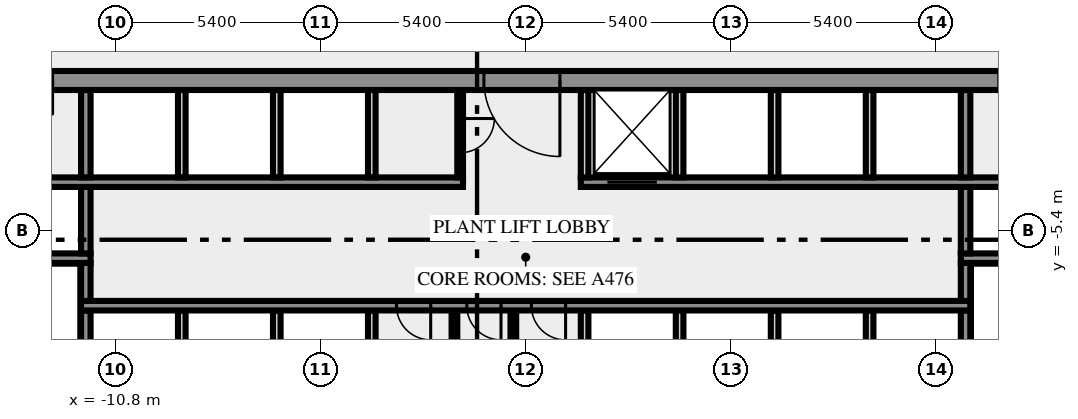
"""IFC4 building model, lengths in metres.
Left out: names, types, materials, properties, quantities, classifications, styles, units other than length and angle.
Written with IfcOpenShell. Run it as: python <this file> out.ifc"""

import sys

from ifc_helpers import new_model, si_unit, direction, frame, frame_2d, origin, place, context, subcontext, project, spatial, rectangle, extrude, element, fill, save


model = new_model("IFC4")
c1 = context("Model", 3, precision=1e-05, world=origin(), true_north=direction((0.0, 1.0)))
c2 = subcontext(c1, "Body", "Model", "MODEL_VIEW")
j1 = project(units=[si_unit("LENGTHUNIT", "METRE"), si_unit("PLANEANGLEUNIT", "RADIAN")], contexts=[c1])
p1 = place(None, origin())
s1 = spatial("IfcSite", under=j1, at=p1, CompositionType="ELEMENT")
p2 = place(p1, origin())
s2 = spatial("IfcBuilding", under=s1, at=p2, CompositionType="ELEMENT")
p3 = place(p2, frame((0.0, 0.0, 133.0)))
s3 = spatial("IfcBuildingStorey", under=s2, at=p3, CompositionType="ELEMENT", Elevation=133.0)
p4 = place(p3, frame((-11.575, -10.5, 0.0), z_axis=(0.0, 0.0, 1.0), x_axis=(0.0, 1.0, 0.0)))
e1 = element("IfcWall", 1, at=p4, inside=s3, PredefinedType="SHEAR", context=c2, shape_type="SweptSolid", body=[
    extrude(rectangle(XDim=3.0, YDim=0.25, at=frame_2d((1.5, 0.0))), origin(), (0.0, 0.0, 1.0), 5.6),
])
for number, where, z_axis, x_axis in (
    (2, (-9.05, -10.5, 0.0), (0.0, 0.0, 1.0), (0.0, 1.0, 0.0)),
    (3, (-6.55, -10.5, 0.0), (0.0, 0.0, 1.0), (0.0, 1.0, 0.0)),
    (4, (-4.05, -10.5, 0.0), (0.0, 0.0, 1.0), (0.0, 1.0, 0.0)),
):
    element("IfcWall", number, at=place(p3, frame(where, z_axis=z_axis, x_axis=x_axis)), inside=s3, PredefinedType="SOLIDWALL", context=c2, shape_type="SweptSolid", body=[
        extrude(rectangle(XDim=3.0, YDim=0.2, at=frame_2d((1.5, 0.0))), origin(), (0.0, 0.0, 1.0), 5.6),
    ])
for number, where, z_axis, x_axis in (
    (5, (-1.875, -10.5, 0.0), (0.0, 0.0, 1.0), (0.0, 1.0, 0.0)),
    (6, (-0.325, -10.5, 0.0), (0.0, 0.0, 1.0), (0.0, 1.0, 0.0)),
):
    element("IfcWall", number, at=place(p3, frame(where, z_axis=z_axis, x_axis=x_axis)), inside=s3, PredefinedType="PARTITIONING", context=c2, shape_type="SweptSolid", body=[
        extrude(rectangle(XDim=3.0, YDim=0.15, at=frame_2d((1.5, 0.0))), origin(), (0.0, 0.0, 1.0), 5.6),
    ])
for number, where, z_axis, x_axis in (
    (7, (1.55, -10.5, 0.0), (0.0, 0.0, 1.0), (0.0, 1.0, 0.0)),
    (8, (4.05, -10.5, 0.0), (0.0, 0.0, 1.0), (0.0, 1.0, 0.0)),
    (9, (6.55, -10.5, 0.0), (0.0, 0.0, 1.0), (0.0, 1.0, 0.0)),
    (10, (9.05, -10.5, 0.0), (0.0, 0.0, 1.0), (0.0, 1.0, 0.0)),
):
    element("IfcWall", number, at=place(p3, frame(where, z_axis=z_axis, x_axis=x_axis)), inside=s3, PredefinedType="SOLIDWALL", context=c2, shape_type="SweptSolid", body=[
        extrude(rectangle(XDim=3.0, YDim=0.2, at=frame_2d((1.5, 0.0))), origin(), (0.0, 0.0, 1.0), 5.6),
    ])
p5 = place(p3, frame((11.575, -10.5, 0.0), z_axis=(0.0, 0.0, 1.0), x_axis=(0.0, 1.0, 0.0)))
e11 = element("IfcWall", 11, at=p5, inside=s3, PredefinedType="SHEAR", context=c2, shape_type="SweptSolid", body=[
    extrude(rectangle(XDim=3.0, YDim=0.25, at=frame_2d((1.5, 0.0))), origin(), (0.0, 0.0, 1.0), 5.6),
])
p6 = place(p3, frame((11.7, -7.375, 0.0), z_axis=(0.0, 0.0, 1.0), x_axis=(-1.0, 0.0, 0.0)))
e12 = element("IfcWall", 12, at=p6, inside=s3, PredefinedType="SHEAR", context=c2, shape_type="SweptSolid", body=[
    extrude(rectangle(XDim=23.4, YDim=0.25, at=frame_2d((11.7, 0.0))), origin(), (0.0, 0.0, 1.0), 5.6),
])
p7 = place(p6, frame((14.2, 0.0, 0.0)))
e13 = element("IfcOpeningElement", 13, at=p7, cuts=e12, PredefinedType="OPENING", context=c2, shape_type="SweptSolid", body=[
    extrude(rectangle(XDim=0.9, YDim=2.1, at=frame_2d((0.45, 1.05))), frame((0.0, 0.135, 0.0), z_axis=(0.0, -1.0, 0.0), x_axis=(1.0, 0.0, 0.0)), (0.0, 0.0, 1.0), 0.27),
])
p8 = place(p6, frame((12.35, 0.0, 0.0)))
e14 = element("IfcOpeningElement", 14, at=p8, cuts=e12, PredefinedType="OPENING", context=c2, shape_type="SweptSolid", body=[
    extrude(rectangle(XDim=0.9, YDim=2.1, at=frame_2d((0.45, 1.05))), frame((0.0, 0.135, 0.0), z_axis=(0.0, -1.0, 0.0), x_axis=(1.0, 0.0, 0.0)), (0.0, 0.0, 1.0), 0.27),
])
p9 = place(p6, frame((10.65, 0.0, 0.0)))
e15 = element("IfcOpeningElement", 15, at=p9, cuts=e12, PredefinedType="OPENING", context=c2, shape_type="SweptSolid", body=[
    extrude(rectangle(XDim=0.9, YDim=2.1, at=frame_2d((0.45, 1.05))), frame((0.0, 0.135, 0.0), z_axis=(0.0, -1.0, 0.0), x_axis=(1.0, 0.0, 0.0)), (0.0, 0.0, 1.0), 0.27),
])
for number, where, z_axis, x_axis in (
    (16, (-11.575, -7.25, 0.0), (0.0, 0.0, 1.0), (0.0, 1.0, 0.0)),
    (17, (11.575, -7.25, 0.0), (0.0, 0.0, 1.0), (0.0, 1.0, 0.0)),
):
    element("IfcWall", number, at=place(p3, frame(where, z_axis=z_axis, x_axis=x_axis)), inside=s3, PredefinedType="SHEAR", context=c2, shape_type="SweptSolid", body=[
        extrude(rectangle(XDim=1.0, YDim=0.25, at=frame_2d((0.5, 0.0))), origin(), (0.0, 0.0, 1.0), 5.6),
    ])
p10 = place(p3, frame((-11.45, -6.125, 0.0), z_axis=(0.0, 0.0, 1.0), x_axis=(-1.0, 0.0, 0.0)))
e18 = element("IfcWall", 18, at=p10, inside=s3, PredefinedType="SHEAR", context=c2, shape_type="SweptSolid", body=[
    extrude(rectangle(XDim=8.05, YDim=0.25, at=frame_2d((4.025, 0.0))), origin(), (0.0, 0.0, 1.0), 5.6),
])
p11 = place(p10, frame((6.2, 0.0, 0.0)))
e19 = element("IfcOpeningElement", 19, at=p11, cuts=e18, PredefinedType="OPENING", context=c2, shape_type="SweptSolid", body=[
    extrude(rectangle(XDim=1.8, YDim=2.1, at=frame_2d((0.9, 1.05))), frame((0.0, 0.135, 0.0), z_axis=(0.0, -1.0, 0.0), x_axis=(1.0, 0.0, 0.0)), (0.0, 0.0, 1.0), 0.27),
])
p12 = place(p3, frame((19.5, -6.125, 0.0), z_axis=(0.0, 0.0, 1.0), x_axis=(-1.0, 0.0, 0.0)))
e20 = element("IfcWall", 20, at=p12, inside=s3, PredefinedType="SHEAR", context=c2, shape_type="SweptSolid", body=[
    extrude(rectangle(XDim=8.05, YDim=0.25, at=frame_2d((4.025, 0.0))), origin(), (0.0, 0.0, 1.0), 5.6),
])
p13 = place(p12, frame((0.05, 0.0, 0.0)))
e21 = element("IfcOpeningElement", 21, at=p13, cuts=e20, PredefinedType="OPENING", context=c2, shape_type="SweptSolid", body=[
    extrude(rectangle(XDim=1.8, YDim=2.1, at=frame_2d((0.9, 1.05))), frame((0.0, 0.135, 0.0), z_axis=(0.0, -1.0, 0.0), x_axis=(1.0, 0.0, 0.0)), (0.0, 0.0, 1.0), 0.27),
])
for number, where, z_axis, x_axis in (
    (22, (-11.575, -6.0, 0.0), (0.0, 0.0, 1.0), (0.0, 1.0, 0.0)),
    (23, (11.575, -6.0, 0.0), (0.0, 0.0, 1.0), (0.0, 1.0, 0.0)),
):
    element("IfcWall", number, at=place(p3, frame(where, z_axis=z_axis, x_axis=x_axis)), inside=s3, PredefinedType="SHEAR", context=c2, shape_type="SweptSolid", body=[
        extrude(rectangle(XDim=1.75, YDim=0.25, at=frame_2d((0.875, 0.0))), origin(), (0.0, 0.0, 1.0), 5.6),
    ])
p14 = place(p3, frame((-14.35, -4.125, 0.0), z_axis=(0.0, 0.0, 1.0), x_axis=(1.0, 0.0, 0.0)))
e24 = element("IfcWall", 24, at=p14, inside=s3, PredefinedType="SHEAR", context=c2, shape_type="SweptSolid", body=[
    extrude(rectangle(XDim=12.7, YDim=0.25, at=frame_2d((6.35, 0.0))), origin(), (0.0, 0.0, 1.0), 5.6),
])
p15 = place(p3, frame((1.45, -4.125, 0.0), z_axis=(0.0, 0.0, 1.0), x_axis=(1.0, 0.0, 0.0)))
e25 = element("IfcWall", 25, at=p15, inside=s3, PredefinedType="SHEAR", context=c2, shape_type="SweptSolid", body=[
    extrude(rectangle(XDim=12.9, YDim=0.25, at=frame_2d((6.45, 0.0))), origin(), (0.0, 0.0, 1.0), 5.6),
])
p16 = place(p15, frame((0.7, 0.0, 0.0)))
e26 = element("IfcOpeningElement", 26, at=p16, cuts=e25, PredefinedType="OPENING", context=c2, shape_type="SweptSolid", body=[
    extrude(rectangle(XDim=1.3, YDim=2.1, at=frame_2d((0.65, 1.05))), frame((0.0, 0.135, 0.0), z_axis=(0.0, -1.0, 0.0), x_axis=(1.0, 0.0, 0.0)), (0.0, 0.0, 1.0), 0.27),
])
p17 = place(p3, frame((-11.575, -4.0, 0.0), z_axis=(0.0, 0.0, 1.0), x_axis=(0.0, 1.0, 0.0)))
e27 = element("IfcWall", 27, at=p17, inside=s3, PredefinedType="SHEAR", context=c2, shape_type="SweptSolid", body=[
    extrude(rectangle(XDim=2.3, YDim=0.25, at=frame_2d((1.15, 0.0))), origin(), (0.0, 0.0, 1.0), 5.6),
])
for number, where, z_axis, x_axis in (
    (28, (-9.05, -4.0, 0.0), (0.0, 0.0, 1.0), (0.0, 1.0, 0.0)),
    (29, (-6.55, -4.0, 0.0), (0.0, 0.0, 1.0), (0.0, 1.0, 0.0)),
    (30, (-4.05, -4.0, 0.0), (0.0, 0.0, 1.0), (0.0, 1.0, 0.0)),
):
    element("IfcWall", number, at=place(p3, frame(where, z_axis=z_axis, x_axis=x_axis)), inside=s3, PredefinedType="SOLIDWALL", context=c2, shape_type="SweptSolid", body=[
        extrude(rectangle(XDim=2.3, YDim=0.2, at=frame_2d((1.15, 0.0))), origin(), (0.0, 0.0, 1.0), 5.6),
    ])
p18 = place(p3, frame((-1.725, -1.7, 0.0), z_axis=(0.0, 0.0, 1.0), x_axis=(0.0, -1.0, 0.0)))
e31 = element("IfcWall", 31, at=p18, inside=s3, PredefinedType="PARTITIONING", context=c2, shape_type="SweptSolid", body=[
    extrude(rectangle(XDim=2.3, YDim=0.15, at=frame_2d((1.15, 0.0))), origin(), (0.0, 0.0, 1.0), 5.6),
])
p19 = place(p18, frame((0.75, 0.0, 0.0)))
e32 = element("IfcOpeningElement", 32, at=p19, cuts=e31, PredefinedType="OPENING", context=c2, shape_type="SweptSolid", body=[
    extrude(rectangle(XDim=0.9, YDim=2.1, at=frame_2d((0.45, 1.05))), frame((0.0, 0.085, 0.0), z_axis=(0.0, -1.0, 0.0), x_axis=(1.0, 0.0, 0.0)), (0.0, 0.0, 1.0), 0.17),
])
for number, where, z_axis, x_axis in (
    (33, (1.55, -4.0, 0.0), (0.0, 0.0, 1.0), (0.0, 1.0, 0.0)),
    (34, (4.05, -4.0, 0.0), (0.0, 0.0, 1.0), (0.0, 1.0, 0.0)),
    (35, (6.55, -4.0, 0.0), (0.0, 0.0, 1.0), (0.0, 1.0, 0.0)),
    (36, (9.05, -4.0, 0.0), (0.0, 0.0, 1.0), (0.0, 1.0, 0.0)),
):
    element("IfcWall", number, at=place(p3, frame(where, z_axis=z_axis, x_axis=x_axis)), inside=s3, PredefinedType="SOLIDWALL", context=c2, shape_type="SweptSolid", body=[
        extrude(rectangle(XDim=2.3, YDim=0.2, at=frame_2d((1.15, 0.0))), origin(), (0.0, 0.0, 1.0), 5.6),
    ])
p20 = place(p3, frame((11.575, -4.0, 0.0), z_axis=(0.0, 0.0, 1.0), x_axis=(0.0, 1.0, 0.0)))
e37 = element("IfcWall", 37, at=p20, inside=s3, PredefinedType="SHEAR", context=c2, shape_type="SweptSolid", body=[
    extrude(rectangle(XDim=2.3, YDim=0.25, at=frame_2d((1.15, 0.0))), origin(), (0.0, 0.0, 1.0), 5.6),
])
p21 = place(p3, frame((20.49, -1.45, 0.0), z_axis=(0.0, 0.0, 1.0), x_axis=(-1.0, 0.0, 0.0)))
e38 = element("IfcWall", 38, at=p21, inside=s3, PredefinedType="SHEAR", context=c2, shape_type="SweptSolid", body=[
    extrude(rectangle(XDim=40.98, YDim=0.5, at=frame_2d((20.49, 0.0))), origin(), (0.0, 0.0, 1.0), 5.6),
])
p22 = place(p21, frame((38.14, 0.0, 0.0)))
e39 = element("IfcOpeningElement", 39, at=p22, cuts=e38, PredefinedType="OPENING", context=c2, shape_type="SweptSolid", body=[
    extrude(rectangle(XDim=1.8, YDim=2.1, at=frame_2d((0.9, 1.05))), frame((0.0, 0.26, 0.0), z_axis=(0.0, -1.0, 0.0), x_axis=(1.0, 0.0, 0.0)), (0.0, 0.0, 1.0), 0.52),
])
p23 = place(p21, frame((35.89, 0.0, 0.0)))
e40 = element("IfcOpeningElement", 40, at=p23, cuts=e38, PredefinedType="OPENING", context=c2, shape_type="SweptSolid", body=[
    extrude(rectangle(XDim=0.9, YDim=2.1, at=frame_2d((0.45, 1.05))), frame((0.0, 0.26, 0.0), z_axis=(0.0, -1.0, 0.0), x_axis=(1.0, 0.0, 0.0)), (0.0, 0.0, 1.0), 0.52),
])
p24 = place(p21, frame((32.94, 0.0, 0.0)))
e41 = element("IfcOpeningElement", 41, at=p24, cuts=e38, PredefinedType="OPENING", context=c2, shape_type="SweptSolid", body=[
    extrude(rectangle(XDim=0.9, YDim=2.1, at=frame_2d((0.45, 1.05))), frame((0.0, 0.26, 0.0), z_axis=(0.0, -1.0, 0.0), x_axis=(1.0, 0.0, 0.0)), (0.0, 0.0, 1.0), 0.52),
])
p25 = place(p21, frame((19.59, 0.0, 0.0)))
e42 = element("IfcOpeningElement", 42, at=p25, cuts=e38, PredefinedType="OPENING", context=c2, shape_type="SweptSolid", body=[
    extrude(rectangle(XDim=2.0, YDim=2.1, at=frame_2d((1.0, 1.05))), frame((0.0, 0.26, 0.0), z_axis=(0.0, -1.0, 0.0), x_axis=(1.0, 0.0, 0.0)), (0.0, 0.0, 1.0), 0.52),
])
p26 = place(p21, frame((7.14, 0.0, 0.0)))
e43 = element("IfcOpeningElement", 43, at=p26, cuts=e38, PredefinedType="OPENING", context=c2, shape_type="SweptSolid", body=[
    extrude(rectangle(XDim=0.9, YDim=2.1, at=frame_2d((0.45, 1.05))), frame((0.0, 0.26, 0.0), z_axis=(0.0, -1.0, 0.0), x_axis=(1.0, 0.0, 0.0)), (0.0, 0.0, 1.0), 0.52),
])
p27 = place(p21, frame((5.028, 0.0, 0.0)))
e44 = element("IfcOpeningElement", 44, at=p27, cuts=e38, PredefinedType="OPENING", context=c2, shape_type="SweptSolid", body=[
    extrude(rectangle(XDim=0.8, YDim=2.1, at=frame_2d((0.4, 1.05))), frame((0.0, 0.26, 0.0), z_axis=(0.0, -1.0, 0.0), x_axis=(1.0, 0.0, 0.0)), (0.0, 0.0, 1.0), 0.52),
])
p28 = place(p21, frame((3.452, 0.0, 0.0)))
e45 = element("IfcOpeningElement", 45, at=p28, cuts=e38, PredefinedType="OPENING", context=c2, shape_type="SweptSolid", body=[
    extrude(rectangle(XDim=0.8, YDim=2.1, at=frame_2d((0.4, 1.05))), frame((0.0, 0.26, 0.0), z_axis=(0.0, -1.0, 0.0), x_axis=(1.0, 0.0, 0.0)), (0.0, 0.0, 1.0), 0.52),
])
p29 = place(p21, frame((1.04, 0.0, 0.0)))
e46 = element("IfcOpeningElement", 46, at=p29, cuts=e38, PredefinedType="OPENING", context=c2, shape_type="SweptSolid", body=[
    extrude(rectangle(XDim=1.8, YDim=2.1, at=frame_2d((0.9, 1.05))), frame((0.0, 0.26, 0.0), z_axis=(0.0, -1.0, 0.0), x_axis=(1.0, 0.0, 0.0)), (0.0, 0.0, 1.0), 0.52),
])
p30 = place(p7, origin())
e47 = element("IfcDoor", 47, at=p30, inside=s3, OperationType="SINGLE_SWING_RIGHT", PredefinedType="DOOR", context=c2, shape_type="SweptSolid", body=[
    extrude(rectangle(XDim=0.9, YDim=2.1, at=frame_2d((0.45, 1.05))), frame((0.0, 0.025, 0.0), z_axis=(0.0, -1.0, 0.0), x_axis=(1.0, 0.0, 0.0)), (0.0, 0.0, 1.0), 0.05),
])
fill(e13, e47)
p31 = place(p8, origin())
e48 = element("IfcDoor", 48, at=p31, inside=s3, OperationType="SINGLE_SWING_RIGHT", PredefinedType="DOOR", context=c2, shape_type="SweptSolid", body=[
    extrude(rectangle(XDim=0.9, YDim=2.1, at=frame_2d((0.45, 1.05))), frame((0.0, 0.025, 0.0), z_axis=(0.0, -1.0, 0.0), x_axis=(1.0, 0.0, 0.0)), (0.0, 0.0, 1.0), 0.05),
])
fill(e14, e48)
p32 = place(p9, origin())
e49 = element("IfcDoor", 49, at=p32, inside=s3, OperationType="SINGLE_SWING_LEFT", PredefinedType="DOOR", context=c2, shape_type="SweptSolid", body=[
    extrude(rectangle(XDim=0.9, YDim=2.1, at=frame_2d((0.45, 1.05))), frame((0.0, 0.025, 0.0), z_axis=(0.0, -1.0, 0.0), x_axis=(1.0, 0.0, 0.0)), (0.0, 0.0, 1.0), 0.05),
])
fill(e15, e49)
p33 = place(p16, origin())
e50 = element("IfcDoor", 50, at=p33, inside=s3, OperationType="DOUBLE_DOOR_SLIDING", PredefinedType="DOOR", context=c2, shape_type="SweptSolid", body=[
    extrude(rectangle(XDim=1.3, YDim=2.1, at=frame_2d((0.65, 1.05))), frame((0.0, 0.025, 0.0), z_axis=(0.0, -1.0, 0.0), x_axis=(1.0, 0.0, 0.0)), (0.0, 0.0, 1.0), 0.05),
])
fill(e26, e50)
p34 = place(p19, origin())
e51 = element("IfcDoor", 51, at=p34, inside=s3, OperationType="SINGLE_SWING_RIGHT", PredefinedType="DOOR", context=c2, shape_type="SweptSolid", body=[
    extrude(rectangle(XDim=0.9, YDim=2.1, at=frame_2d((0.45, 1.05))), frame((0.0, 0.025, 0.0), z_axis=(0.0, -1.0, 0.0), x_axis=(1.0, 0.0, 0.0)), (0.0, 0.0, 1.0), 0.05),
])
fill(e32, e51)
p35 = place(p25, origin())
e52 = element("IfcDoor", 52, at=p35, inside=s3, OperationType="DOUBLE_DOOR_SINGLE_SWING", PredefinedType="DOOR", context=c2, shape_type="SweptSolid", body=[
    extrude(rectangle(XDim=2.0, YDim=2.1, at=frame_2d((1.0, 1.05))), frame((0.0, 0.025, 0.0), z_axis=(0.0, -1.0, 0.0), x_axis=(1.0, 0.0, 0.0)), (0.0, 0.0, 1.0), 0.05),
])
fill(e42, e52)
save(model, sys.argv[1])
